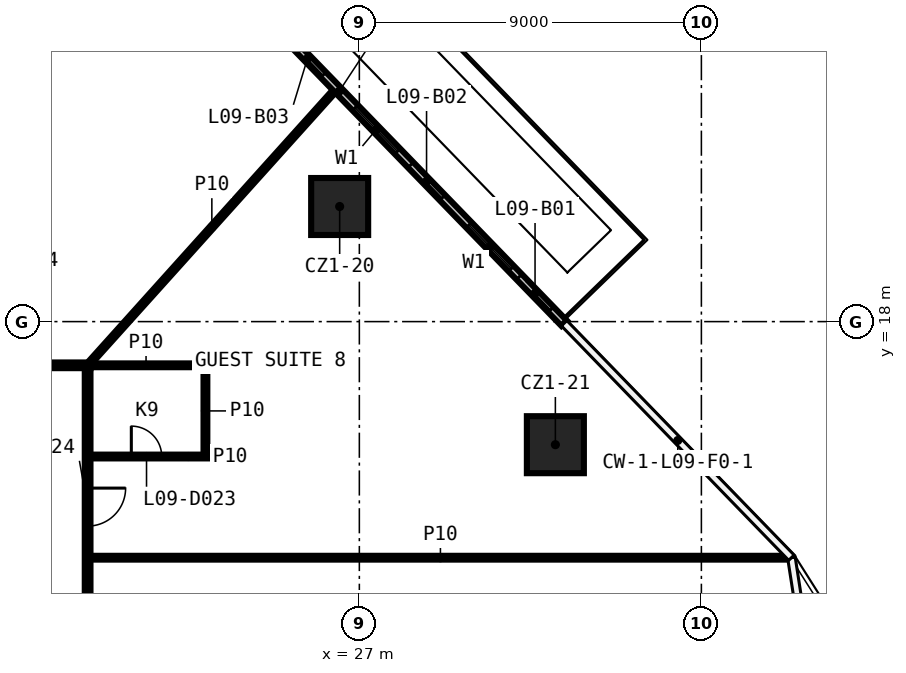
"""IFC4 building model, lengths in metres.
Left out: names, types, materials, properties, quantities, classifications, styles, units other than length and angle.
Written with IfcOpenShell. Run it as: python <this file> out.ifc"""

import sys

from ifc_helpers import new_model, si_unit, direction, frame, frame_2d, origin, origin_2d, place, context, subcontext, project, spatial, rectangle, extrude, element, fill, save


model = new_model("IFC4")
c1 = context("Model", 3, precision=1e-05, world=origin(), true_north=direction((0.0, 1.0)))
c2 = subcontext(c1, "Body", "Model", "MODEL_VIEW")
j1 = project(units=[si_unit("LENGTHUNIT", "METRE"), si_unit("PLANEANGLEUNIT", "RADIAN")], contexts=[c1])
p1 = place(None, origin())
s1 = spatial("IfcSite", under=j1, at=p1, CompositionType="ELEMENT")
p2 = place(p1, origin())
s2 = spatial("IfcBuilding", under=s1, at=p2, CompositionType="ELEMENT")
p3 = place(p2, frame((0.0, 0.0, 55.1)))
s3 = spatial("IfcBuildingStorey", under=s2, at=p3, CompositionType="ELEMENT", Elevation=55.1)
for number, where, z_axis, x_axis in (
    (1, (26.482, 21.029, 0.0), (0.0, 0.0, 1.0), (1.0, 0.0, 0.0)),
    (2, (32.158, 14.761, 0.0), (0.0, 0.0, 1.0), (1.0, 0.0, 0.0)),
):
    element("IfcColumn", number, at=place(p3, frame(where, z_axis=z_axis, x_axis=x_axis)), inside=s3, PredefinedType="COLUMN", context=c2, shape_type="SweptSolid", body=[
        extrude(rectangle(XDim=1.5, YDim=1.5, at=origin_2d()), origin(), (0.0, 0.0, 1.0), 3.3),
    ])
p4 = place(p3, frame((19.925, 11.787, 0.0), z_axis=(0.0, 0.0, 1.0), x_axis=(1.0, 0.0, 0.0)))
e3 = element("IfcWall", 3, at=p4, inside=s3, PredefinedType="PARTITIONING", context=c2, shape_type="SweptSolid", body=[
    extrude(rectangle(XDim=18.417, YDim=0.1, at=frame_2d((9.208, 0.0))), origin(), (0.0, 0.0, 1.0), 3.3),
])
p5 = place(p3, frame((19.925, 14.45, 0.0), z_axis=(0.0, 0.0, 1.0), x_axis=(1.0, 0.0, 0.0)))
e4 = element("IfcWall", 4, at=p5, inside=s3, PredefinedType="PARTITIONING", context=c2, shape_type="SweptSolid", body=[
    extrude(rectangle(XDim=3.075, YDim=0.1, at=frame_2d((1.538, 0.0))), origin(), (0.0, 0.0, 1.0), 3.3),
])
p6 = place(p5, frame((1.075, 0.0, 0.0)))
e5 = element("IfcOpeningElement", 5, at=p6, cuts=e4, PredefinedType="OPENING", context=c2, shape_type="SweptSolid", body=[
    extrude(rectangle(XDim=0.8, YDim=2.1, at=frame_2d((0.4, 1.05))), frame((0.0, 0.06, 0.0), z_axis=(0.0, -1.0, 0.0), x_axis=(1.0, 0.0, 0.0)), (0.0, 0.0, 1.0), 0.12),
])
p7 = place(p3, frame((-19.925, 16.85, 0.0), z_axis=(0.0, 0.0, 1.0), x_axis=(1.0, 0.0, 0.0)))
e6 = element("IfcWall", 6, at=p7, inside=s3, PredefinedType="PARTITIONING", context=c2, shape_type="SweptSolid", body=[
    extrude(rectangle(XDim=39.85, YDim=0.15, at=frame_2d((19.925, 0.0))), origin(), (0.0, 0.0, 1.0), 3.3),
])
p8 = place(p7, frame((31.433, 0.0, 0.0)))
e7 = element("IfcOpeningElement", 7, at=p8, cuts=e6, PredefinedType="OPENING", context=c2, shape_type="SweptSolid", body=[
    extrude(rectangle(XDim=0.9, YDim=2.1, at=frame_2d((0.45, 1.05))), frame((0.0, 0.085, 0.0), z_axis=(0.0, -1.0, 0.0), x_axis=(1.0, 0.0, 0.0)), (0.0, 0.0, 1.0), 0.17),
])
p9 = place(p7, frame((22.043, 0.0, 0.0)))
e8 = element("IfcOpeningElement", 8, at=p9, cuts=e6, PredefinedType="OPENING", context=c2, shape_type="SweptSolid", body=[
    extrude(rectangle(XDim=0.9, YDim=2.1, at=frame_2d((0.45, 1.05))), frame((0.0, 0.085, 0.0), z_axis=(0.0, -1.0, 0.0), x_axis=(1.0, 0.0, 0.0)), (0.0, 0.0, 1.0), 0.17),
])
p10 = place(p7, frame((16.957, 0.0, 0.0)))
e9 = element("IfcOpeningElement", 9, at=p10, cuts=e6, PredefinedType="OPENING", context=c2, shape_type="SweptSolid", body=[
    extrude(rectangle(XDim=0.9, YDim=2.1, at=frame_2d((0.45, 1.05))), frame((0.0, 0.085, 0.0), z_axis=(0.0, -1.0, 0.0), x_axis=(1.0, 0.0, 0.0)), (0.0, 0.0, 1.0), 0.17),
])
p11 = place(p7, frame((13.572, 0.0, 0.0)))
e10 = element("IfcOpeningElement", 10, at=p11, cuts=e6, PredefinedType="OPENING", context=c2, shape_type="SweptSolid", body=[
    extrude(rectangle(XDim=0.9, YDim=2.1, at=frame_2d((0.45, 1.05))), frame((0.0, 0.085, 0.0), z_axis=(0.0, -1.0, 0.0), x_axis=(1.0, 0.0, 0.0)), (0.0, 0.0, 1.0), 0.17),
])
p12 = place(p7, frame((7.458, 0.0, 0.0)))
e11 = element("IfcOpeningElement", 11, at=p12, cuts=e6, PredefinedType="OPENING", context=c2, shape_type="SweptSolid", body=[
    extrude(rectangle(XDim=1.0, YDim=2.1, at=frame_2d((0.5, 1.05))), frame((0.0, 0.085, 0.0), z_axis=(0.0, -1.0, 0.0), x_axis=(1.0, 0.0, 0.0)), (0.0, 0.0, 1.0), 0.17),
])
p13 = place(p3, frame((19.775, 16.85, 0.0), z_axis=(0.0, 0.0, 1.0), x_axis=(1.0, 0.0, 0.0)))
e12 = element("IfcWall", 12, at=p13, inside=s3, PredefinedType="PARTITIONING", context=c2, shape_type="SweptSolid", body=[
    extrude(rectangle(XDim=3.225, YDim=0.1, at=frame_2d((1.613, 0.0))), origin(), (0.0, 0.0, 1.0), 3.3),
])
p14 = place(p3, frame((19.85, 16.85, 0.0), z_axis=(0.0, 0.0, 1.0), x_axis=(0.668734291705, 0.743501477536, 0.0)))
e13 = element("IfcWall", 13, at=p14, inside=s3, PredefinedType="PARTITIONING", context=c2, shape_type="SweptSolid", body=[
    extrude(rectangle(XDim=9.776, YDim=0.1, at=frame_2d((4.888, 0.0))), origin(), (0.0, 0.0, 1.0), 3.3),
])
p15 = place(p3, frame((22.95, 14.5, 0.0), z_axis=(0.0, 0.0, 1.0), x_axis=(0.0, 1.0, 0.0)))
e14 = element("IfcWall", 14, at=p15, inside=s3, PredefinedType="PARTITIONING", context=c2, shape_type="SweptSolid", body=[
    extrude(rectangle(XDim=2.3, YDim=0.1, at=frame_2d((1.15, 0.0))), origin(), (0.0, 0.0, 1.0), 3.3),
])
p16 = place(p3, frame((19.85, 16.775, 0.0), z_axis=(0.0, 0.0, 1.0), x_axis=(0.0, -1.0, 0.0)))
e15 = element("IfcWall", 15, at=p16, inside=s3, PredefinedType="PARTITIONING", context=c2, shape_type="SweptSolid", body=[
    extrude(rectangle(XDim=33.55, YDim=0.15, at=frame_2d((16.775, 0.0))), origin(), (0.0, 0.0, 1.0), 3.3),
])
p17 = place(p16, frame((32.158, 0.0, 0.0)))
e16 = element("IfcOpeningElement", 16, at=p17, cuts=e15, PredefinedType="OPENING", context=c2, shape_type="SweptSolid", body=[
    extrude(rectangle(XDim=1.0, YDim=2.1, at=frame_2d((0.5, 1.05))), frame((0.0, 0.085, 0.0), z_axis=(0.0, -1.0, 0.0), x_axis=(1.0, 0.0, 0.0)), (0.0, 0.0, 1.0), 0.17),
])
p18 = place(p16, frame((20.094, 0.0, 0.0)))
e17 = element("IfcOpeningElement", 17, at=p18, cuts=e15, PredefinedType="OPENING", context=c2, shape_type="SweptSolid", body=[
    extrude(rectangle(XDim=1.0, YDim=2.1, at=frame_2d((0.5, 1.05))), frame((0.0, 0.085, 0.0), z_axis=(0.0, -1.0, 0.0), x_axis=(1.0, 0.0, 0.0)), (0.0, 0.0, 1.0), 0.17),
])
p19 = place(p16, frame((18.428, 0.0, 0.0)))
e18 = element("IfcOpeningElement", 18, at=p19, cuts=e15, PredefinedType="OPENING", context=c2, shape_type="SweptSolid", body=[
    extrude(rectangle(XDim=1.0, YDim=2.1, at=frame_2d((0.5, 1.05))), frame((0.0, 0.085, 0.0), z_axis=(0.0, -1.0, 0.0), x_axis=(1.0, 0.0, 0.0)), (0.0, 0.0, 1.0), 0.17),
])
p20 = place(p16, frame((10.072, 0.0, 0.0)))
e19 = element("IfcOpeningElement", 19, at=p20, cuts=e15, PredefinedType="OPENING", context=c2, shape_type="SweptSolid", body=[
    extrude(rectangle(XDim=1.0, YDim=2.1, at=frame_2d((0.5, 1.05))), frame((0.0, 0.085, 0.0), z_axis=(0.0, -1.0, 0.0), x_axis=(1.0, 0.0, 0.0)), (0.0, 0.0, 1.0), 0.17),
])
p21 = place(p16, frame((3.156, 0.0, 0.0)))
e20 = element("IfcOpeningElement", 20, at=p21, cuts=e15, PredefinedType="OPENING", context=c2, shape_type="SweptSolid", body=[
    extrude(rectangle(XDim=1.0, YDim=2.1, at=frame_2d((0.5, 1.05))), frame((0.0, 0.085, 0.0), z_axis=(0.0, -1.0, 0.0), x_axis=(1.0, 0.0, 0.0)), (0.0, 0.0, 1.0), 0.17),
])
p22 = place(p3, frame((32.389, 17.957, 0.0), z_axis=(0.0, 0.0, 1.0), x_axis=(-0.696038792441, 0.718004177855, 0.0)))
e21 = element("IfcWall", 21, at=p22, inside=s3, PredefinedType="SOLIDWALL", context=c2, shape_type="SweptSolid", body=[
    extrude(rectangle(XDim=17.206, YDim=0.2, at=frame_2d((8.603, 0.0))), origin(), (0.0, 0.0, 1.0), 3.3),
])
p23 = place(p22, frame((2.0, 0.0, 0.6)))
e22 = element("IfcOpeningElement", 22, at=p23, cuts=e21, PredefinedType="OPENING", context=c2, shape_type="SweptSolid", body=[
    extrude(rectangle(XDim=1.6, YDim=2.4, at=frame_2d((0.8, 1.2))), frame((0.0, 0.11, 0.0), z_axis=(0.0, -1.0, 0.0), x_axis=(1.0, 0.0, 0.0)), (0.0, 0.0, 1.0), 0.22),
])
p24 = place(p22, frame((0.5, 0.0, 0.0)))
e23 = element("IfcOpeningElement", 23, at=p24, cuts=e21, PredefinedType="OPENING", context=c2, shape_type="SweptSolid", body=[
    extrude(rectangle(XDim=1.2, YDim=2.4, at=frame_2d((0.6, 1.2))), frame((0.0, 0.11, 0.0), z_axis=(0.0, -1.0, 0.0), x_axis=(1.0, 0.0, 0.0)), (0.0, 0.0, 1.0), 0.22),
])
p25 = place(p22, frame((6.302, 0.0, 0.6)))
e24 = element("IfcOpeningElement", 24, at=p25, cuts=e21, PredefinedType="OPENING", context=c2, shape_type="SweptSolid", body=[
    extrude(rectangle(XDim=1.6, YDim=2.4, at=frame_2d((0.8, 1.2))), frame((0.0, 0.11, 0.0), z_axis=(0.0, -1.0, 0.0), x_axis=(1.0, 0.0, 0.0)), (0.0, 0.0, 1.0), 0.22),
])
p26 = place(p22, frame((4.601, 0.0, 0.0)))
e25 = element("IfcOpeningElement", 25, at=p26, cuts=e21, PredefinedType="OPENING", context=c2, shape_type="SweptSolid", body=[
    extrude(rectangle(XDim=1.2, YDim=2.4, at=frame_2d((0.6, 1.2))), frame((0.0, 0.11, 0.0), z_axis=(0.0, -1.0, 0.0), x_axis=(1.0, 0.0, 0.0)), (0.0, 0.0, 1.0), 0.22),
])
p27 = place(p22, frame((10.603, 0.0, 0.6)))
e26 = element("IfcOpeningElement", 26, at=p27, cuts=e21, PredefinedType="OPENING", context=c2, shape_type="SweptSolid", body=[
    extrude(rectangle(XDim=1.6, YDim=2.4, at=frame_2d((0.8, 1.2))), frame((0.0, 0.11, 0.0), z_axis=(0.0, -1.0, 0.0), x_axis=(1.0, 0.0, 0.0)), (0.0, 0.0, 1.0), 0.22),
])
p28 = place(p22, frame((9.103, 0.0, 0.0)))
e27 = element("IfcOpeningElement", 27, at=p28, cuts=e21, PredefinedType="OPENING", context=c2, shape_type="SweptSolid", body=[
    extrude(rectangle(XDim=1.2, YDim=2.4, at=frame_2d((0.6, 1.2))), frame((0.0, 0.11, 0.0), z_axis=(0.0, -1.0, 0.0), x_axis=(1.0, 0.0, 0.0)), (0.0, 0.0, 1.0), 0.22),
])
p29 = place(p22, frame((13.404, 0.0, 0.6)))
e28 = element("IfcOpeningElement", 28, at=p29, cuts=e21, PredefinedType="OPENING", context=c2, shape_type="SweptSolid", body=[
    extrude(rectangle(XDim=1.6, YDim=2.4, at=frame_2d((0.8, 1.2))), frame((0.0, 0.11, 0.0), z_axis=(0.0, -1.0, 0.0), x_axis=(1.0, 0.0, 0.0)), (0.0, 0.0, 1.0), 0.22),
])
p30 = place(p22, frame((15.504, 0.0, 0.0)))
e29 = element("IfcOpeningElement", 29, at=p30, cuts=e21, PredefinedType="OPENING", context=c2, shape_type="SweptSolid", body=[
    extrude(rectangle(XDim=1.2, YDim=2.4, at=frame_2d((0.6, 1.2))), frame((0.0, 0.11, 0.0), z_axis=(0.0, -1.0, 0.0), x_axis=(1.0, 0.0, 0.0)), (0.0, 0.0, 1.0), 0.22),
])
p31 = place(p6, origin())
e30 = element("IfcDoor", 30, at=p31, inside=s3, OperationType="SINGLE_SWING_RIGHT", PredefinedType="DOOR", context=c2, shape_type="SweptSolid", body=[
    extrude(rectangle(XDim=0.8, YDim=2.1, at=frame_2d((0.4, 1.05))), frame((0.0, 0.025, 0.0), z_axis=(0.0, -1.0, 0.0), x_axis=(1.0, 0.0, 0.0)), (0.0, 0.0, 1.0), 0.05),
])
fill(e5, e30)
p32 = place(p21, origin())
e31 = element("IfcDoor", 31, at=p32, inside=s3, OperationType="SINGLE_SWING_LEFT", PredefinedType="DOOR", context=c2, shape_type="SweptSolid", body=[
    extrude(rectangle(XDim=1.0, YDim=2.1, at=frame_2d((0.5, 1.05))), frame((0.0, 0.025, 0.0), z_axis=(0.0, -1.0, 0.0), x_axis=(1.0, 0.0, 0.0)), (0.0, 0.0, 1.0), 0.05),
])
fill(e20, e31)
p33 = place(p23, origin())
e32 = element("IfcWindow", 32, at=p33, inside=s3, PartitioningType="SINGLE_PANEL", PredefinedType="WINDOW", context=c2, shape_type="SweptSolid", body=[
    extrude(rectangle(XDim=1.6, YDim=2.4, at=frame_2d((0.8, 1.2))), frame((0.0, 0.03, 0.0), z_axis=(0.0, -1.0, 0.0), x_axis=(1.0, 0.0, 0.0)), (0.0, 0.0, 1.0), 0.06),
])
fill(e22, e32)
p34 = place(p24, origin())
e33 = element("IfcDoor", 33, at=p34, inside=s3, OperationType="SLIDING_TO_LEFT", PredefinedType="DOOR", context=c2, shape_type="SweptSolid", body=[
    extrude(rectangle(XDim=1.2, YDim=2.4, at=frame_2d((0.6, 1.2))), frame((0.0, 0.025, 0.0), z_axis=(0.0, -1.0, 0.0), x_axis=(1.0, 0.0, 0.0)), (0.0, 0.0, 1.0), 0.05),
])
fill(e23, e33)
p35 = place(p25, origin())
e34 = element("IfcWindow", 34, at=p35, inside=s3, PartitioningType="SINGLE_PANEL", PredefinedType="WINDOW", context=c2, shape_type="SweptSolid", body=[
    extrude(rectangle(XDim=1.6, YDim=2.4, at=frame_2d((0.8, 1.2))), frame((0.0, 0.03, 0.0), z_axis=(0.0, -1.0, 0.0), x_axis=(1.0, 0.0, 0.0)), (0.0, 0.0, 1.0), 0.06),
])
fill(e24, e34)
p36 = place(p26, origin())
e35 = element("IfcDoor", 35, at=p36, inside=s3, OperationType="SLIDING_TO_LEFT", PredefinedType="DOOR", context=c2, shape_type="SweptSolid", body=[
    extrude(rectangle(XDim=1.2, YDim=2.4, at=frame_2d((0.6, 1.2))), frame((0.0, 0.025, 0.0), z_axis=(0.0, -1.0, 0.0), x_axis=(1.0, 0.0, 0.0)), (0.0, 0.0, 1.0), 0.05),
])
fill(e25, e35)
p37 = place(p28, origin())
e36 = element("IfcDoor", 36, at=p37, inside=s3, OperationType="SLIDING_TO_LEFT", PredefinedType="DOOR", context=c2, shape_type="SweptSolid", body=[
    extrude(rectangle(XDim=1.2, YDim=2.4, at=frame_2d((0.6, 1.2))), frame((0.0, 0.025, 0.0), z_axis=(0.0, -1.0, 0.0), x_axis=(1.0, 0.0, 0.0)), (0.0, 0.0, 1.0), 0.05),
])
fill(e27, e36)
save(model, sys.argv[1])
